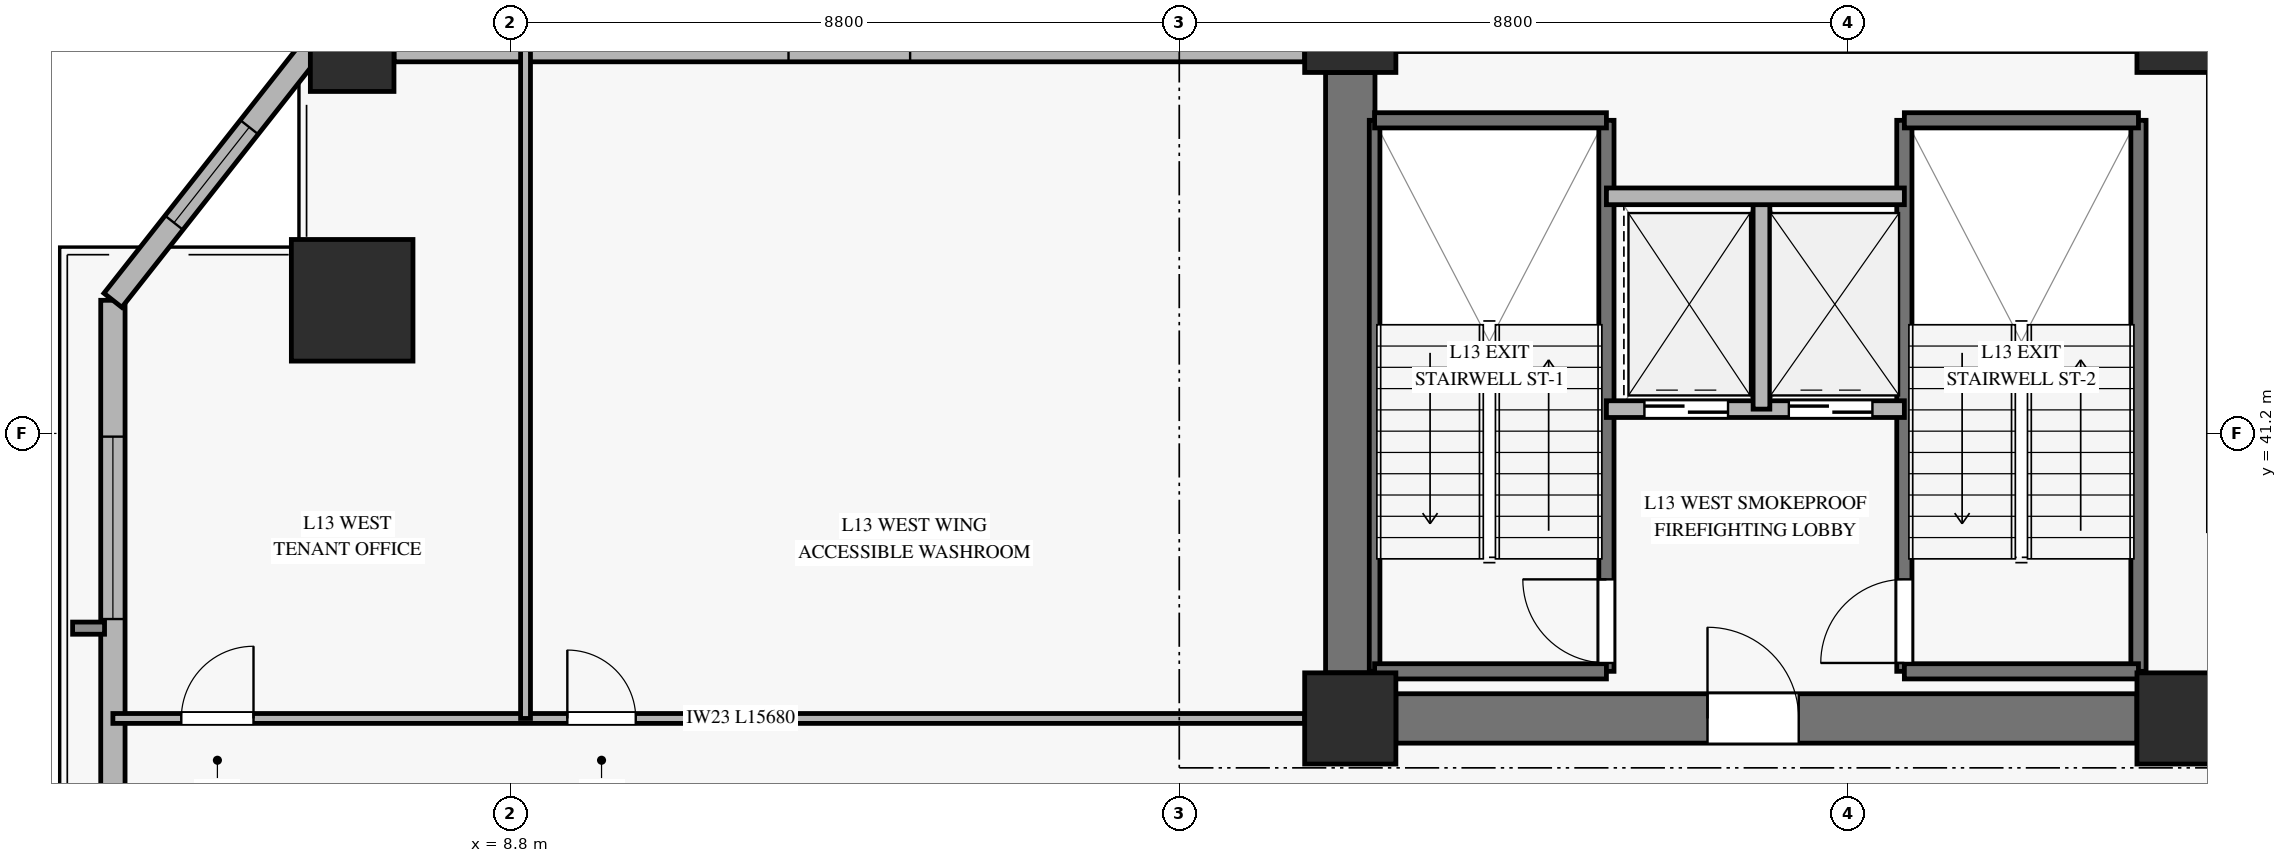
"""IFC4 building model, lengths in metres.
Left out: names, types, materials, properties, quantities, classifications, styles, units other than length and angle.
Written with IfcOpenShell. Run it as: python <this file> out.ifc"""

import sys

from ifc_helpers import new_model, si_unit, direction, frame, frame_2d, origin, origin_2d, place, context, subcontext, project, spatial, rectangle, hollow_rectangle, extrude, source, transform, mapped, element, fill, save


model = new_model("IFC4")
c1 = context("Model", 3, precision=1e-05, world=origin(), true_north=direction((0.0, 1.0)))
c2 = subcontext(c1, "Body", "Model", "MODEL_VIEW")
j1 = project(units=[si_unit("LENGTHUNIT", "METRE"), si_unit("PLANEANGLEUNIT", "RADIAN")], contexts=[c1])
p1 = place(None, origin())
s1 = spatial("IfcSite", under=j1, at=p1, CompositionType="ELEMENT")
p2 = place(p1, origin())
s2 = spatial("IfcBuilding", under=s1, at=p2, CompositionType="ELEMENT")
p3 = place(p2, frame((0.0, 0.0, 53.3)))
s3 = spatial("IfcBuildingStorey", under=s2, at=p3, CompositionType="ELEMENT", Elevation=53.3)
m1 = source(origin(), c2, "Body", "SweptSolid", [
    extrude(rectangle(XDim=1.2, YDim=1.2, at=origin_2d()), origin(), (0.0, 0.0, 1.0), 3.68),
])
for number, where, z_axis, x_axis in (
    (1, (19.85, 37.45, 0.0), (0.0, 0.0, 1.0), (1.0, 0.0, 0.0)),
    (2, (19.85, 46.55, 0.0), (0.0, 0.0, 1.0), (1.0, 0.0, 0.0)),
    (3, (30.8, 37.45, 0.0), (0.0, 0.0, 1.0), (1.0, 0.0, 0.0)),
    (4, (30.8, 46.55, 0.0), (0.0, 0.0, 1.0), (1.0, 0.0, 0.0)),
):
    element("IfcColumn", number, at=place(p3, frame(where, z_axis=z_axis, x_axis=x_axis)), inside=s3, PredefinedType="PILASTER", context=c2, shape_type="MappedRepresentation", body=[
        mapped(m1, transform((0.0, 0.0, 0.0), x_axis=(1.0, 0.0, 0.0), y_axis=(0.0, 1.0, 0.0), z_axis=(0.0, 0.0, 1.0), scale=1.0)),
    ])
p4 = place(p3, frame((20.45, 37.45, 0.0), z_axis=(0.0, 0.0, 1.0), x_axis=(1.0, 0.0, 0.0)))
e5 = element("IfcWall", 5, at=p4, inside=s3, PredefinedType="SHEAR", context=c2, shape_type="SweptSolid", body=[
    extrude(rectangle(XDim=9.75, YDim=0.65, at=frame_2d((4.875, 0.0))), origin(), (0.0, 0.0, 1.0), 3.68),
])
p5 = place(p4, frame((4.1, 0.0, 0.0)))
e6 = element("IfcOpeningElement", 6, at=p5, cuts=e5, PredefinedType="OPENING", context=c2, shape_type="SweptSolid", body=[
    extrude(rectangle(XDim=1.2, YDim=2.15, at=frame_2d((0.6, 1.075))), frame((0.0, 0.335, 0.0), z_axis=(0.0, -1.0, 0.0), x_axis=(1.0, 0.0, 0.0)), (0.0, 0.0, 1.0), 0.67),
])
p6 = place(p3, frame((19.85, 38.05, 0.0), z_axis=(0.0, 0.0, 1.0), x_axis=(0.0, 1.0, 0.0)))
e7 = element("IfcWall", 7, at=p6, inside=s3, PredefinedType="SHEAR", context=c2, shape_type="SweptSolid", body=[
    extrude(rectangle(XDim=7.9, YDim=0.65, at=frame_2d((3.95, 0.0))), origin(), (0.0, 0.0, 1.0), 3.68),
])
m2 = source(origin(), c2, "Body", "SweptSolid", [
    extrude(hollow_rectangle(XDim=1.6, YDim=1.6, WallThickness=0.075, at=origin_2d()), origin(), (0.0, 0.0, 1.0), 3.68),
])
p7 = place(p3, frame((6.718, 42.952, 0.0), z_axis=(0.0, 0.0, 1.0), x_axis=(1.0, 0.0, 0.0)))
e8 = element("IfcColumn", 8, at=p7, inside=s3, PredefinedType="COLUMN", context=c2, shape_type="MappedRepresentation", body=[
    mapped(m2, transform((0.0, 0.0, 0.0), x_axis=(1.0, 0.0, 0.0), y_axis=(0.0, 1.0, 0.0), z_axis=(0.0, 0.0, 1.0), scale=1.0)),
])
m3 = source(origin(), c2, "Body", "SweptSolid", [
    extrude(hollow_rectangle(XDim=1.1, YDim=1.1, WallThickness=0.05, at=origin_2d()), origin(), (0.0, 0.0, 1.0), 3.68),
])
p8 = place(p3, frame((6.718, 46.25, 0.0), z_axis=(0.0, 0.0, 1.0), x_axis=(1.0, 0.0, 0.0)))
e9 = element("IfcColumn", 9, at=p8, inside=s3, PredefinedType="COLUMN", context=c2, shape_type="MappedRepresentation", body=[
    mapped(m3, transform((0.0, 0.0, 0.0), x_axis=(1.0, 0.0, 0.0), y_axis=(0.0, 1.0, 0.0), z_axis=(0.0, 0.0, 1.0), scale=1.0)),
])
p9 = place(p3, frame((3.57, 25.777, 0.0), z_axis=(0.0, 0.0, 1.0), x_axis=(0.0, 1.0, 0.0)))
e10 = element("IfcWall", 10, at=p9, inside=s3, PredefinedType="SOLIDWALL", context=c2, shape_type="SweptSolid", body=[
    extrude(rectangle(XDim=17.175, YDim=0.32, at=frame_2d((8.587, 0.0))), origin(), (0.0, 0.0, 1.0), 3.16),
])
p10 = place(p9, frame((1.225, 0.0, 0.45)))
e11 = element("IfcOpeningElement", 11, at=p10, cuts=e10, PredefinedType="OPENING", context=c2, shape_type="SweptSolid", body=[
    extrude(rectangle(XDim=2.4, YDim=2.1, at=frame_2d((1.2, 1.05))), frame((0.0, 0.17, 0.0), z_axis=(0.0, -1.0, 0.0), x_axis=(1.0, 0.0, 0.0)), (0.0, 0.0, 1.0), 0.34),
])
p11 = place(p9, frame((12.981, 0.0, 0.45)))
e12 = element("IfcOpeningElement", 12, at=p11, cuts=e10, PredefinedType="OPENING", context=c2, shape_type="SweptSolid", body=[
    extrude(rectangle(XDim=2.4, YDim=2.1, at=frame_2d((1.2, 1.05))), frame((0.0, 0.17, 0.0), z_axis=(0.0, -1.0, 0.0), x_axis=(1.0, 0.0, 0.0)), (0.0, 0.0, 1.0), 0.34),
])
p12 = place(p3, frame((7.268, 46.25, 0.0), z_axis=(0.0, 0.0, 1.0), x_axis=(1.0, 0.0, 0.0)))
e13 = element("IfcWall", 13, at=p12, inside=s3, PredefinedType="SOLIDWALL", context=c2, shape_type="SweptSolid", body=[
    extrude(rectangle(XDim=11.982, YDim=0.32, at=frame_2d((5.991, 0.0))), origin(), (0.0, 0.0, 1.0), 3.16),
])
p13 = place(p12, frame((5.191, 0.0, 0.45)))
e14 = element("IfcOpeningElement", 14, at=p13, cuts=e13, PredefinedType="OPENING", context=c2, shape_type="SweptSolid", body=[
    extrude(rectangle(XDim=1.6, YDim=2.0, at=frame_2d((0.8, 1.0))), frame((0.0, 0.17, 0.0), z_axis=(0.0, -1.0, 0.0), x_axis=(1.0, 0.0, 0.0)), (0.0, 0.0, 1.0), 0.34),
])
p14 = place(p3, frame((6.168, 46.25, 0.0), z_axis=(0.0, 0.0, 1.0), x_axis=(-0.618784156162, -0.785561053059, 0.0)))
e15 = element("IfcWall", 15, at=p14, inside=s3, PredefinedType="SOLIDWALL", context=c2, shape_type="SweptSolid", body=[
    extrude(rectangle(XDim=4.198, YDim=0.3, at=frame_2d((2.099, 0.0))), origin(), (0.0, 0.0, 1.0), 3.16),
])
p15 = place(p14, frame((1.299, 0.0, 0.45)))
e16 = element("IfcOpeningElement", 16, at=p15, cuts=e15, PredefinedType="OPENING", context=c2, shape_type="SweptSolid", body=[
    extrude(rectangle(XDim=1.6, YDim=2.0, at=frame_2d((0.8, 1.0))), frame((0.0, 0.16, 0.0), z_axis=(0.0, -1.0, 0.0), x_axis=(1.0, 0.0, 0.0)), (0.0, 0.0, 1.0), 0.32),
])
p16 = place(p3, frame((20.17, 38.07, 0.0), z_axis=(0.0, 0.0, 1.0), x_axis=(0.0, 1.0, 0.0)))
e17 = element("IfcWall", 17, at=p16, inside=s3, PredefinedType="SOLIDWALL", context=c2, shape_type="SweptSolid", body=[
    extrude(rectangle(XDim=7.25, YDim=0.14, at=frame_2d((3.625, 0.0))), origin(), (0.0, 0.0, 1.0), 3.9),
])
p17 = place(p3, frame((23.22, 38.07, 0.0), z_axis=(0.0, 0.0, 1.0), x_axis=(0.0, 1.0, 0.0)))
e18 = element("IfcWall", 18, at=p17, inside=s3, PredefinedType="SOLIDWALL", context=c2, shape_type="SweptSolid", body=[
    extrude(rectangle(XDim=7.25, YDim=0.2, at=frame_2d((3.625, 0.0))), origin(), (0.0, 0.0, 1.0), 3.9),
])
p18 = place(p17, frame((0.11, 0.0, 0.0)))
e19 = element("IfcOpeningElement", 19, at=p18, cuts=e18, PredefinedType="OPENING", context=c2, shape_type="SweptSolid", body=[
    extrude(rectangle(XDim=1.1, YDim=2.15, at=frame_2d((0.55, 1.075))), frame((0.0, 0.11, 0.0), z_axis=(0.0, -1.0, 0.0), x_axis=(1.0, 0.0, 0.0)), (0.0, 0.0, 1.0), 0.22),
])
for number, where, z_axis, x_axis in (
    (20, (20.17, 45.32, 0.0), (0.0, 0.0, 1.0), (1.0, 0.0, 0.0)),
    (21, (20.17, 38.07, 0.0), (0.0, 0.0, 1.0), (1.0, 0.0, 0.0)),
):
    element("IfcWall", number, at=place(p3, frame(where, z_axis=z_axis, x_axis=x_axis)), inside=s3, PredefinedType="SOLIDWALL", context=c2, shape_type="SweptSolid", body=[
        extrude(rectangle(XDim=3.05, YDim=0.2, at=frame_2d((1.525, 0.0))), origin(), (0.0, 0.0, 1.0), 3.9),
    ])
p19 = place(p3, frame((27.14, 38.07, 0.0), z_axis=(0.0, 0.0, 1.0), x_axis=(0.0, 1.0, 0.0)))
e22 = element("IfcWall", 22, at=p19, inside=s3, PredefinedType="SOLIDWALL", context=c2, shape_type="SweptSolid", body=[
    extrude(rectangle(XDim=7.25, YDim=0.2, at=frame_2d((3.625, 0.0))), origin(), (0.0, 0.0, 1.0), 3.9),
])
p20 = place(p19, frame((0.11, 0.0, 0.0)))
e23 = element("IfcOpeningElement", 23, at=p20, cuts=e22, PredefinedType="OPENING", context=c2, shape_type="SweptSolid", body=[
    extrude(rectangle(XDim=1.1, YDim=2.15, at=frame_2d((0.55, 1.075))), frame((0.0, 0.11, 0.0), z_axis=(0.0, -1.0, 0.0), x_axis=(1.0, 0.0, 0.0)), (0.0, 0.0, 1.0), 0.22),
])
p21 = place(p3, frame((30.22, 38.07, 0.0), z_axis=(0.0, 0.0, 1.0), x_axis=(0.0, 1.0, 0.0)))
e24 = element("IfcWall", 24, at=p21, inside=s3, PredefinedType="SOLIDWALL", context=c2, shape_type="SweptSolid", body=[
    extrude(rectangle(XDim=7.25, YDim=0.2, at=frame_2d((3.625, 0.0))), origin(), (0.0, 0.0, 1.0), 3.9),
])
for number, where, z_axis, x_axis in (
    (25, (27.14, 45.32, 0.0), (0.0, 0.0, 1.0), (1.0, 0.0, 0.0)),
    (26, (27.14, 38.07, 0.0), (0.0, 0.0, 1.0), (1.0, 0.0, 0.0)),
):
    element("IfcWall", number, at=place(p3, frame(where, z_axis=z_axis, x_axis=x_axis)), inside=s3, PredefinedType="SOLIDWALL", context=c2, shape_type="SweptSolid", body=[
        extrude(rectangle(XDim=3.08, YDim=0.2, at=frame_2d((1.54, 0.0))), origin(), (0.0, 0.0, 1.0), 3.9),
    ])
p22 = place(p3, frame((23.22, 41.52, 0.0), z_axis=(0.0, 0.0, 1.0), x_axis=(1.0, 0.0, 0.0)))
e27 = element("IfcWall", 27, at=p22, inside=s3, PredefinedType="SOLIDWALL", context=c2, shape_type="SweptSolid", body=[
    extrude(rectangle(XDim=3.92, YDim=0.22, at=frame_2d((1.96, 0.0))), origin(), (0.0, 0.0, 1.0), 3.68),
])
p23 = place(p22, frame((0.5, 0.0, 0.0)))
e28 = element("IfcOpeningElement", 28, at=p23, cuts=e27, PredefinedType="OPENING", context=c2, shape_type="SweptSolid", body=[
    extrude(rectangle(XDim=1.1, YDim=2.2, at=frame_2d((0.55, 1.1))), frame((0.0, 0.12, 0.0), z_axis=(0.0, -1.0, 0.0), x_axis=(1.0, 0.0, 0.0)), (0.0, 0.0, 1.0), 0.24),
])
p24 = place(p22, frame((2.4, 0.0, 0.0)))
e29 = element("IfcOpeningElement", 29, at=p24, cuts=e27, PredefinedType="OPENING", context=c2, shape_type="SweptSolid", body=[
    extrude(rectangle(XDim=1.1, YDim=2.2, at=frame_2d((0.55, 1.1))), frame((0.0, 0.12, 0.0), z_axis=(0.0, -1.0, 0.0), x_axis=(1.0, 0.0, 0.0)), (0.0, 0.0, 1.0), 0.24),
])
p25 = place(p3, frame((25.26, 41.52, 0.0), z_axis=(0.0, 0.0, 1.0), x_axis=(0.0, 1.0, 0.0)))
e30 = element("IfcWall", 30, at=p25, inside=s3, PredefinedType="SOLIDWALL", context=c2, shape_type="SweptSolid", body=[
    extrude(rectangle(XDim=2.8, YDim=0.22, at=frame_2d((1.4, 0.0))), origin(), (0.0, 0.0, 1.0), 3.68),
])
p26 = place(p3, frame((23.22, 44.32, 0.0), z_axis=(0.0, 0.0, 1.0), x_axis=(1.0, 0.0, 0.0)))
e31 = element("IfcWall", 31, at=p26, inside=s3, PredefinedType="SOLIDWALL", context=c2, shape_type="SweptSolid", body=[
    extrude(rectangle(XDim=3.92, YDim=0.22, at=frame_2d((1.96, 0.0))), origin(), (0.0, 0.0, 1.0), 3.68),
])
p27 = place(p3, frame((3.57, 37.45, 0.0), z_axis=(0.0, 0.0, 1.0), x_axis=(1.0, 0.0, 0.0)))
e32 = element("IfcWall", 32, at=p27, inside=s3, PredefinedType="PARTITIONING", context=c2, shape_type="SweptSolid", body=[
    extrude(rectangle(XDim=15.68, YDim=0.13, at=frame_2d((7.84, 0.0))), origin(), (0.0, 0.0, 1.0), 3.165),
])
p28 = place(p27, frame((0.9, 0.0, 0.0)))
e33 = element("IfcOpeningElement", 33, at=p28, cuts=e32, PredefinedType="OPENING", context=c2, shape_type="SweptSolid", body=[
    extrude(rectangle(XDim=0.95, YDim=2.1, at=frame_2d((0.475, 1.05))), frame((0.0, 0.075, 0.0), z_axis=(0.0, -1.0, 0.0), x_axis=(1.0, 0.0, 0.0)), (0.0, 0.0, 1.0), 0.15),
])
p29 = place(p27, frame((5.979, 0.0, 0.0)))
e34 = element("IfcOpeningElement", 34, at=p29, cuts=e32, PredefinedType="OPENING", context=c2, shape_type="SweptSolid", body=[
    extrude(rectangle(XDim=0.9, YDim=2.1, at=frame_2d((0.45, 1.05))), frame((0.0, 0.075, 0.0), z_axis=(0.0, -1.0, 0.0), x_axis=(1.0, 0.0, 0.0)), (0.0, 0.0, 1.0), 0.15),
])
p30 = place(p3, frame((8.999, 37.45, 0.0), z_axis=(0.0, 0.0, 1.0), x_axis=(0.0, 1.0, 0.0)))
e35 = element("IfcWall", 35, at=p30, inside=s3, PredefinedType="PARTITIONING", context=c2, shape_type="SweptSolid", body=[
    extrude(rectangle(XDim=8.8, YDim=0.13, at=frame_2d((4.4, 0.0))), origin(), (0.0, 0.0, 1.0), 3.68),
])
m4 = source(origin(), c2, "Body", "SweptSolid", [
    extrude(rectangle(XDim=2.4, YDim=2.1, at=frame_2d((1.2, 1.05))), frame((0.0, 0.03, 0.0), z_axis=(0.0, -1.0, 0.0), x_axis=(1.0, 0.0, 0.0)), (0.0, 0.0, 1.0), 0.06),
])
p31 = place(p11, origin())
e36 = element("IfcWindow", 36, at=p31, inside=s3, PartitioningType="SINGLE_PANEL", PredefinedType="WINDOW", context=c2, shape_type="MappedRepresentation", body=[
    mapped(m4, transform((0.0, 0.0, 0.0), x_axis=(1.0, 0.0, 0.0), y_axis=(0.0, 1.0, 0.0), z_axis=(0.0, 0.0, 1.0), scale=1.0)),
])
fill(e12, e36)
m5 = source(origin(), c2, "Body", "SweptSolid", [
    extrude(rectangle(XDim=1.6, YDim=2.0, at=frame_2d((0.8, 1.0))), frame((0.0, 0.03, 0.0), z_axis=(0.0, -1.0, 0.0), x_axis=(1.0, 0.0, 0.0)), (0.0, 0.0, 1.0), 0.06),
])
p32 = place(p15, origin())
e37 = element("IfcWindow", 37, at=p32, inside=s3, PartitioningType="SINGLE_PANEL", PredefinedType="WINDOW", context=c2, shape_type="MappedRepresentation", body=[
    mapped(m5, transform((0.0, 0.0, 0.0), x_axis=(1.0, 0.0, 0.0), y_axis=(0.0, 1.0, 0.0), z_axis=(0.0, 0.0, 1.0), scale=1.0)),
])
fill(e16, e37)
m6 = source(origin(), c2, "Body", "SweptSolid", [
    extrude(rectangle(XDim=1.1, YDim=2.15, at=frame_2d((0.55, 1.075))), frame((0.0, 0.025, 0.0), z_axis=(0.0, -1.0, 0.0), x_axis=(1.0, 0.0, 0.0)), (0.0, 0.0, 1.0), 0.05),
])
p33 = place(p18, origin())
e38 = element("IfcDoor", 38, at=p33, inside=s3, OperationType="SINGLE_SWING_RIGHT", PredefinedType="DOOR", context=c2, shape_type="MappedRepresentation", body=[
    mapped(m6, transform((0.0, 0.0, 0.0), x_axis=(1.0, 0.0, 0.0), y_axis=(0.0, 1.0, 0.0), z_axis=(0.0, 0.0, 1.0), scale=1.0)),
])
fill(e19, e38)
p34 = place(p20, origin())
e39 = element("IfcDoor", 39, at=p34, inside=s3, OperationType="SINGLE_SWING_LEFT", PredefinedType="DOOR", context=c2, shape_type="MappedRepresentation", body=[
    mapped(m6, transform((0.0, 0.0, 0.0), x_axis=(1.0, 0.0, 0.0), y_axis=(0.0, 1.0, 0.0), z_axis=(0.0, 0.0, 1.0), scale=1.0)),
])
fill(e23, e39)
m7 = source(origin(), c2, "Body", "SweptSolid", [
    extrude(rectangle(XDim=1.1, YDim=2.2, at=frame_2d((0.55, 1.1))), frame((0.0, 0.025, 0.0), z_axis=(0.0, -1.0, 0.0), x_axis=(1.0, 0.0, 0.0)), (0.0, 0.0, 1.0), 0.05),
])
p35 = place(p23, origin())
e40 = element("IfcDoor", 40, at=p35, inside=s3, OperationType="SLIDING_TO_LEFT", PredefinedType="DOOR", context=c2, shape_type="MappedRepresentation", body=[
    mapped(m7, transform((0.0, 0.0, 0.0), x_axis=(1.0, 0.0, 0.0), y_axis=(0.0, 1.0, 0.0), z_axis=(0.0, 0.0, 1.0), scale=1.0)),
])
fill(e28, e40)
p36 = place(p24, origin())
e41 = element("IfcDoor", 41, at=p36, inside=s3, OperationType="SLIDING_TO_LEFT", PredefinedType="DOOR", context=c2, shape_type="MappedRepresentation", body=[
    mapped(m7, transform((0.0, 0.0, 0.0), x_axis=(1.0, 0.0, 0.0), y_axis=(0.0, 1.0, 0.0), z_axis=(0.0, 0.0, 1.0), scale=1.0)),
])
fill(e29, e41)
m8 = source(origin(), c2, "Body", "SweptSolid", [
    extrude(rectangle(XDim=1.2, YDim=2.15, at=frame_2d((0.6, 1.075))), frame((0.0, 0.025, 0.0), z_axis=(0.0, -1.0, 0.0), x_axis=(1.0, 0.0, 0.0)), (0.0, 0.0, 1.0), 0.05),
])
p37 = place(p5, origin())
e42 = element("IfcDoor", 42, at=p37, inside=s3, OperationType="SINGLE_SWING_LEFT", PredefinedType="DOOR", context=c2, shape_type="MappedRepresentation", body=[
    mapped(m8, transform((0.0, 0.0, 0.0), x_axis=(1.0, 0.0, 0.0), y_axis=(0.0, 1.0, 0.0), z_axis=(0.0, 0.0, 1.0), scale=1.0)),
])
fill(e6, e42)
m9 = source(origin(), c2, "Body", "SweptSolid", [
    extrude(rectangle(XDim=0.95, YDim=2.1, at=frame_2d((0.475, 1.05))), frame((0.0, 0.025, 0.0), z_axis=(0.0, -1.0, 0.0), x_axis=(1.0, 0.0, 0.0)), (0.0, 0.0, 1.0), 0.05),
])
p38 = place(p28, origin())
e43 = element("IfcDoor", 43, at=p38, inside=s3, OperationType="SINGLE_SWING_RIGHT", PredefinedType="DOOR", context=c2, shape_type="MappedRepresentation", body=[
    mapped(m9, transform((0.0, 0.0, 0.0), x_axis=(1.0, 0.0, 0.0), y_axis=(0.0, 1.0, 0.0), z_axis=(0.0, 0.0, 1.0), scale=1.0)),
])
fill(e33, e43)
m10 = source(origin(), c2, "Body", "SweptSolid", [
    extrude(rectangle(XDim=0.9, YDim=2.1, at=frame_2d((0.45, 1.05))), frame((0.0, 0.025, 0.0), z_axis=(0.0, -1.0, 0.0), x_axis=(1.0, 0.0, 0.0)), (0.0, 0.0, 1.0), 0.05),
])
p39 = place(p29, origin())
e44 = element("IfcDoor", 44, at=p39, inside=s3, OperationType="SINGLE_SWING_LEFT", PredefinedType="DOOR", context=c2, shape_type="MappedRepresentation", body=[
    mapped(m10, transform((0.0, 0.0, 0.0), x_axis=(1.0, 0.0, 0.0), y_axis=(0.0, 1.0, 0.0), z_axis=(0.0, 0.0, 1.0), scale=1.0)),
])
fill(e34, e44)
save(model, sys.argv[1])
